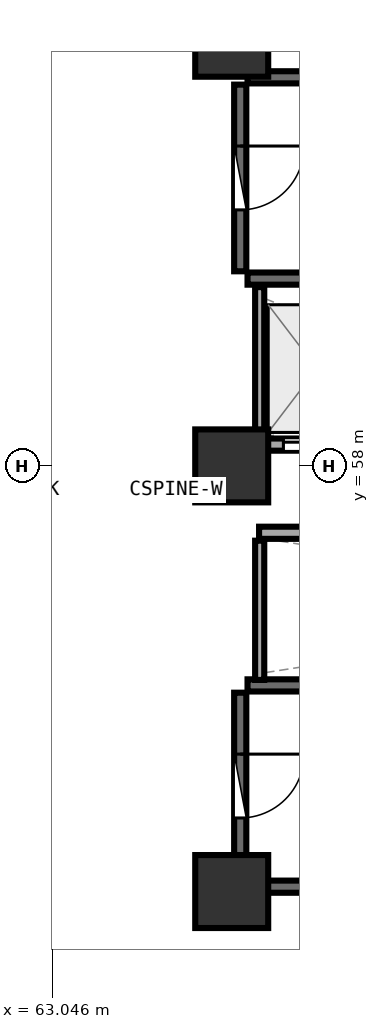
"""IFC4 building model, lengths in metres.
Left out: names, types, materials, properties, quantities, classifications, styles, units other than length and angle.
Written with IfcOpenShell. Run it as: python <this file> out.ifc"""

import sys

from ifc_helpers import new_model, si_unit, direction, frame, frame_2d, origin, origin_2d, place, context, subcontext, project, spatial, rectangle, extrude, element, fill, save


model = new_model("IFC4")
c1 = context("Model", 3, precision=1e-05, world=origin(), true_north=direction((0.0, 1.0)))
c2 = subcontext(c1, "Body", "Model", "MODEL_VIEW")
j1 = project(units=[si_unit("LENGTHUNIT", "METRE"), si_unit("PLANEANGLEUNIT", "RADIAN")], contexts=[c1])
p1 = place(None, origin())
s1 = spatial("IfcSite", under=j1, at=p1, CompositionType="ELEMENT")
p2 = place(p1, origin())
s2 = spatial("IfcBuilding", under=s1, at=p2, CompositionType="ELEMENT")
p3 = place(p2, frame((0.0, 0.0, 102.6)))
s3 = spatial("IfcBuildingStorey", under=s2, at=p3, CompositionType="ELEMENT", Elevation=102.6)
for number, where, z_axis, x_axis in (
    (1, (66.0, 51.0, 0.0), (0.0, 0.0, 1.0), (1.0, 0.0, 0.0)),
    (2, (66.0, 65.0, 0.0), (0.0, 0.0, 1.0), (1.0, 0.0, 0.0)),
    (3, (66.0, 58.0, 0.0), (0.0, 0.0, 1.0), (1.0, 0.0, 0.0)),
):
    element("IfcColumn", number, at=place(p3, frame(where, z_axis=z_axis, x_axis=x_axis)), inside=s3, PredefinedType="PILASTER", context=c2, shape_type="SweptSolid", body=[
        extrude(rectangle(XDim=1.2, YDim=1.2, at=origin_2d()), origin(), (0.0, 0.0, 1.0), 3.75),
    ])
for number, where, z_axis, x_axis in (
    (4, (66.26, 61.08, 0.0), (0.0, 0.0, 1.0), (1.0, 0.0, 0.0)),
    (5, (73.42, 64.39, 0.0), (0.0, 0.0, 1.0), (-1.0, 0.0, 0.0)),
):
    element("IfcWall", number, at=place(p3, frame(where, z_axis=z_axis, x_axis=x_axis)), inside=s3, PredefinedType="SHEAR", context=c2, shape_type="SweptSolid", body=[
        extrude(rectangle(XDim=7.16, YDim=0.2, at=frame_2d((3.58, 0.0))), origin(), (0.0, 0.0, 1.0), 3.49),
    ])
p4 = place(p3, frame((66.14, 64.27, 0.0), z_axis=(0.0, 0.0, 1.0), x_axis=(0.0, -1.0, 0.0)))
e6 = element("IfcWall", 6, at=p4, inside=s3, PredefinedType="SHEAR", context=c2, shape_type="SweptSolid", body=[
    extrude(rectangle(XDim=3.07, YDim=0.2, at=frame_2d((1.535, 0.0))), origin(), (0.0, 0.0, 1.0), 3.49),
])
p5 = place(p4, frame((1.01, 0.0, 0.0)))
e7 = element("IfcOpeningElement", 7, at=p5, cuts=e6, PredefinedType="OPENING", context=c2, shape_type="SweptSolid", body=[
    extrude(rectangle(XDim=1.05, YDim=2.1, at=frame_2d((0.525, 1.05))), frame((0.0, 0.11, 0.0), z_axis=(0.0, -1.0, 0.0), x_axis=(1.0, 0.0, 0.0)), (0.0, 0.0, 1.0), 0.22),
])
for number, where, z_axis, x_axis in (
    (8, (66.26, 51.08, 0.0), (0.0, 0.0, 1.0), (1.0, 0.0, 0.0)),
    (9, (73.42, 54.39, 0.0), (0.0, 0.0, 1.0), (-1.0, 0.0, 0.0)),
):
    element("IfcWall", number, at=place(p3, frame(where, z_axis=z_axis, x_axis=x_axis)), inside=s3, PredefinedType="SHEAR", context=c2, shape_type="SweptSolid", body=[
        extrude(rectangle(XDim=7.16, YDim=0.2, at=frame_2d((3.58, 0.0))), origin(), (0.0, 0.0, 1.0), 3.49),
    ])
p6 = place(p3, frame((66.14, 54.27, 0.0), z_axis=(0.0, 0.0, 1.0), x_axis=(0.0, -1.0, 0.0)))
e10 = element("IfcWall", 10, at=p6, inside=s3, PredefinedType="SHEAR", context=c2, shape_type="SweptSolid", body=[
    extrude(rectangle(XDim=3.07, YDim=0.2, at=frame_2d((1.535, 0.0))), origin(), (0.0, 0.0, 1.0), 3.49),
])
p7 = place(p6, frame((1.01, 0.0, 0.0)))
e11 = element("IfcOpeningElement", 11, at=p7, cuts=e10, PredefinedType="OPENING", context=c2, shape_type="SweptSolid", body=[
    extrude(rectangle(XDim=1.05, YDim=2.1, at=frame_2d((0.525, 1.05))), frame((0.0, 0.11, 0.0), z_axis=(0.0, -1.0, 0.0), x_axis=(1.0, 0.0, 0.0)), (0.0, 0.0, 1.0), 0.22),
])
p8 = place(p3, frame((66.45, 58.35, 0.0), z_axis=(0.0, 0.0, 1.0), x_axis=(1.0, 0.0, 0.0)))
e12 = element("IfcWall", 12, at=p8, inside=s3, PredefinedType="SOLIDWALL", context=c2, shape_type="SweptSolid", body=[
    extrude(rectangle(XDim=6.0, YDim=0.2, at=frame_2d((3.0, 0.0))), origin(), (0.0, 0.0, 1.0), 3.48),
])
p9 = place(p8, frame((0.4, 0.0, 0.0)))
e13 = element("IfcOpeningElement", 13, at=p9, cuts=e12, PredefinedType="OPENING", context=c2, shape_type="SweptSolid", body=[
    extrude(rectangle(XDim=1.1, YDim=2.1, at=frame_2d((0.55, 1.05))), frame((0.0, 0.11, 0.0), z_axis=(0.0, -1.0, 0.0), x_axis=(1.0, 0.0, 0.0)), (0.0, 0.0, 1.0), 0.22),
])
p10 = place(p8, frame((2.4, 0.0, 0.0)))
e14 = element("IfcOpeningElement", 14, at=p10, cuts=e12, PredefinedType="OPENING", context=c2, shape_type="SweptSolid", body=[
    extrude(rectangle(XDim=1.1, YDim=2.1, at=frame_2d((0.55, 1.05))), frame((0.0, 0.11, 0.0), z_axis=(0.0, -1.0, 0.0), x_axis=(1.0, 0.0, 0.0)), (0.0, 0.0, 1.0), 0.22),
])
p11 = place(p8, frame((4.4, 0.0, 0.0)))
e15 = element("IfcOpeningElement", 15, at=p11, cuts=e12, PredefinedType="OPENING", context=c2, shape_type="SweptSolid", body=[
    extrude(rectangle(XDim=1.1, YDim=2.1, at=frame_2d((0.55, 1.05))), frame((0.0, 0.11, 0.0), z_axis=(0.0, -1.0, 0.0), x_axis=(1.0, 0.0, 0.0)), (0.0, 0.0, 1.0), 0.22),
])
p12 = place(p3, frame((66.46, 58.48, 0.0), z_axis=(0.0, 0.0, 1.0), x_axis=(0.0, 1.0, 0.0)))
e16 = element("IfcWall", 16, at=p12, inside=s3, PredefinedType="PARTITIONING", context=c2, shape_type="SweptSolid", body=[
    extrude(rectangle(XDim=2.46, YDim=0.15, at=frame_2d((1.23, 0.0))), origin(), (0.0, 0.0, 1.0), 3.48),
])
p13 = place(p3, frame((66.45, 56.9, 0.0), z_axis=(0.0, 0.0, 1.0), x_axis=(1.0, 0.0, 0.0)))
e17 = element("IfcWall", 17, at=p13, inside=s3, PredefinedType="SOLIDWALL", context=c2, shape_type="SweptSolid", body=[
    extrude(rectangle(XDim=14.4, YDim=0.2, at=frame_2d((7.2, 0.0))), origin(), (0.0, 0.0, 1.0), 3.48),
])
p14 = place(p3, frame((66.46, 54.48, 0.0), z_axis=(0.0, 0.0, 1.0), x_axis=(0.0, 1.0, 0.0)))
e18 = element("IfcWall", 18, at=p14, inside=s3, PredefinedType="PARTITIONING", context=c2, shape_type="SweptSolid", body=[
    extrude(rectangle(XDim=2.29, YDim=0.15, at=frame_2d((1.145, 0.0))), origin(), (0.0, 0.0, 1.0), 3.48),
])
p15 = place(p5, origin())
e19 = element("IfcDoor", 19, at=p15, inside=s3, OperationType="SINGLE_SWING_LEFT", PredefinedType="DOOR", context=c2, shape_type="SweptSolid", body=[
    extrude(rectangle(XDim=1.05, YDim=2.1, at=frame_2d((0.525, 1.05))), frame((0.0, 0.025, 0.0), z_axis=(0.0, -1.0, 0.0), x_axis=(1.0, 0.0, 0.0)), (0.0, 0.0, 1.0), 0.05),
])
fill(e7, e19)
p16 = place(p7, origin())
e20 = element("IfcDoor", 20, at=p16, inside=s3, OperationType="SINGLE_SWING_LEFT", PredefinedType="DOOR", context=c2, shape_type="SweptSolid", body=[
    extrude(rectangle(XDim=1.05, YDim=2.1, at=frame_2d((0.525, 1.05))), frame((0.0, 0.025, 0.0), z_axis=(0.0, -1.0, 0.0), x_axis=(1.0, 0.0, 0.0)), (0.0, 0.0, 1.0), 0.05),
])
fill(e11, e20)
p17 = place(p9, origin())
e21 = element("IfcDoor", 21, at=p17, inside=s3, OperationType="DOUBLE_DOOR_SLIDING", PredefinedType="DOOR", context=c2, shape_type="SweptSolid", body=[
    extrude(rectangle(XDim=1.1, YDim=2.1, at=frame_2d((0.55, 1.05))), frame((0.0, 0.025, 0.0), z_axis=(0.0, -1.0, 0.0), x_axis=(1.0, 0.0, 0.0)), (0.0, 0.0, 1.0), 0.05),
])
fill(e13, e21)
save(model, sys.argv[1])
